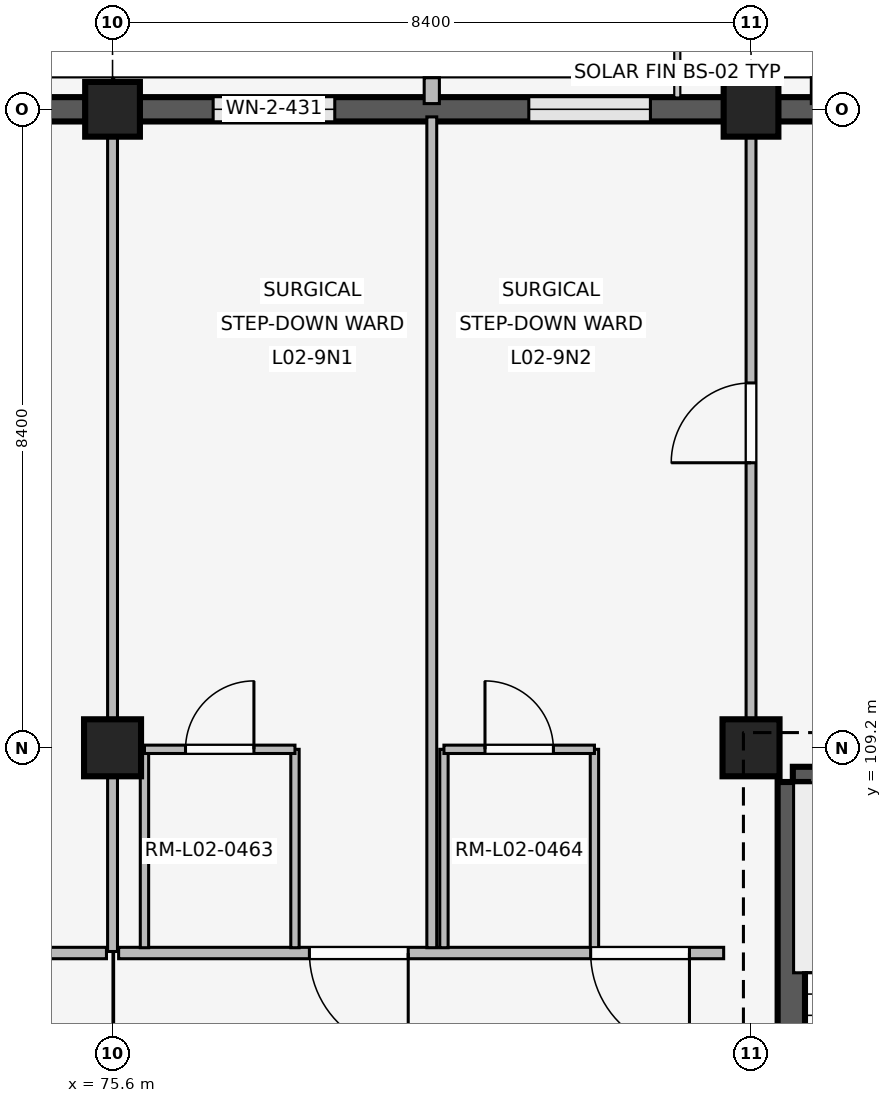
"""IFC4 building model, lengths in metres.
Left out: names, types, materials, properties, quantities, classifications, styles, units other than length and angle.
Written with IfcOpenShell. Run it as: python <this file> out.ifc"""

import sys

from ifc_helpers import new_model, si_unit, direction, frame, frame_2d, origin, origin_2d, place, context, subcontext, project, spatial, rectangle, extrude, element, fill, save


model = new_model("IFC4")
c1 = context("Model", 3, precision=1e-05, world=origin(), true_north=direction((0.0, 1.0)))
c2 = subcontext(c1, "Body", "Model", "MODEL_VIEW")
j1 = project(units=[si_unit("LENGTHUNIT", "METRE"), si_unit("PLANEANGLEUNIT", "RADIAN")], contexts=[c1])
p1 = place(None, origin())
s1 = spatial("IfcSite", under=j1, at=p1, CompositionType="ELEMENT")
p2 = place(p1, origin())
s2 = spatial("IfcBuilding", under=s1, at=p2, CompositionType="ELEMENT")
p3 = place(p2, frame((0.0, 0.0, 8.1)))
s3 = spatial("IfcBuildingStorey", under=s2, at=p3, CompositionType="ELEMENT", Elevation=8.1)
p4 = place(p3, frame((75.6, 109.2, 0.0), z_axis=(0.0, 0.0, 1.0), x_axis=(1.0, 0.0, 0.0)))
e1 = element("IfcColumn", 1, at=p4, inside=s3, PredefinedType="COLUMN", context=c2, shape_type="SweptSolid", body=[
    extrude(rectangle(XDim=0.75, YDim=0.75, at=origin_2d()), origin(), (0.0, 0.0, 1.0), 4.8),
])
p5 = place(p3, frame((75.6, 117.6, 0.0), z_axis=(0.0, 0.0, 1.0), x_axis=(1.0, 0.0, 0.0)))
e2 = element("IfcColumn", 2, at=p5, inside=s3, PredefinedType="COLUMN", context=c2, shape_type="SweptSolid", body=[
    extrude(rectangle(XDim=0.72, YDim=0.72, at=origin_2d()), origin(), (0.0, 0.0, 1.0), 4.8),
])
p6 = place(p3, frame((84.0, 109.2, 0.0), z_axis=(0.0, 0.0, 1.0), x_axis=(1.0, 0.0, 0.0)))
e3 = element("IfcColumn", 3, at=p6, inside=s3, PredefinedType="COLUMN", context=c2, shape_type="SweptSolid", body=[
    extrude(rectangle(XDim=0.75, YDim=0.75, at=origin_2d()), origin(), (0.0, 0.0, 1.0), 4.8),
])
p7 = place(p3, frame((84.0, 117.6, 0.0), z_axis=(0.0, 0.0, 1.0), x_axis=(1.0, 0.0, 0.0)))
e4 = element("IfcColumn", 4, at=p7, inside=s3, PredefinedType="COLUMN", context=c2, shape_type="SweptSolid", body=[
    extrude(rectangle(XDim=0.72, YDim=0.72, at=origin_2d()), origin(), (0.0, 0.0, 1.0), 4.8),
])
p8 = place(p3, frame((67.555, 117.6, 0.0), z_axis=(0.0, 0.0, 1.0), x_axis=(1.0, 0.0, 0.0)))
e5 = element("IfcWall", 5, at=p8, inside=s3, PredefinedType="SOLIDWALL", context=c2, shape_type="SweptSolid", body=[
    extrude(rectangle(XDim=7.69, YDim=0.32, at=frame_2d((3.845, 0.0))), origin(), (0.0, 0.0, 1.0), 3.86),
])
p9 = place(p8, frame((0.959, 0.0, 0.85)))
e6 = element("IfcOpeningElement", 6, at=p9, cuts=e5, PredefinedType="OPENING", context=c2, shape_type="SweptSolid", body=[
    extrude(rectangle(XDim=1.62, YDim=1.52, at=frame_2d((0.81, 0.76))), frame((0.0, 0.17, 0.0), z_axis=(0.0, -1.0, 0.0), x_axis=(1.0, 0.0, 0.0)), (0.0, 0.0, 1.0), 0.34),
])
p10 = place(p8, frame((5.111, 0.0, 0.85)))
e7 = element("IfcOpeningElement", 7, at=p10, cuts=e5, PredefinedType="OPENING", context=c2, shape_type="SweptSolid", body=[
    extrude(rectangle(XDim=1.62, YDim=1.52, at=frame_2d((0.81, 0.76))), frame((0.0, 0.17, 0.0), z_axis=(0.0, -1.0, 0.0), x_axis=(1.0, 0.0, 0.0)), (0.0, 0.0, 1.0), 0.34),
])
p11 = place(p3, frame((75.955, 117.6, 0.0), z_axis=(0.0, 0.0, 1.0), x_axis=(1.0, 0.0, 0.0)))
e8 = element("IfcWall", 8, at=p11, inside=s3, PredefinedType="SOLIDWALL", context=c2, shape_type="SweptSolid", body=[
    extrude(rectangle(XDim=7.69, YDim=0.32, at=frame_2d((3.845, 0.0))), origin(), (0.0, 0.0, 1.0), 3.86),
])
p12 = place(p11, frame((0.969, 0.0, 0.85)))
e9 = element("IfcOpeningElement", 9, at=p12, cuts=e8, PredefinedType="OPENING", context=c2, shape_type="SweptSolid", body=[
    extrude(rectangle(XDim=1.6, YDim=1.65, at=frame_2d((0.8, 0.825))), frame((0.0, 0.17, 0.0), z_axis=(0.0, -1.0, 0.0), x_axis=(1.0, 0.0, 0.0)), (0.0, 0.0, 1.0), 0.34),
])
p13 = place(p11, frame((5.121, 0.0, 0.85)))
e10 = element("IfcOpeningElement", 10, at=p13, cuts=e8, PredefinedType="OPENING", context=c2, shape_type="SweptSolid", body=[
    extrude(rectangle(XDim=1.6, YDim=1.65, at=frame_2d((0.8, 0.825))), frame((0.0, 0.17, 0.0), z_axis=(0.0, -1.0, 0.0), x_axis=(1.0, 0.0, 0.0)), (0.0, 0.0, 1.0), 0.34),
])
p14 = place(p3, frame((79.8, 117.675, 0.0), z_axis=(0.0, 0.0, 1.0), x_axis=(0.0, 1.0, 0.0)))
e11 = element("IfcWall", 11, at=p14, inside=s3, PredefinedType="ELEMENTEDWALL", context=c2, shape_type="SweptSolid", body=[
    extrude(rectangle(XDim=0.34, YDim=0.2, at=frame_2d((0.17, 0.0))), origin(), (0.0, 0.0, 1.0), 3.84),
])
p15 = place(p3, frame((84.355, 117.6, 0.0), z_axis=(0.0, 0.0, 1.0), x_axis=(1.0, 0.0, 0.0)))
e12 = element("IfcWall", 12, at=p15, inside=s3, PredefinedType="SOLIDWALL", context=c2, shape_type="SweptSolid", body=[
    extrude(rectangle(XDim=7.69, YDim=0.32, at=frame_2d((3.845, 0.0))), origin(), (0.0, 0.0, 1.0), 3.86),
])
p16 = place(p15, frame((1.009, 0.0, 0.85)))
e13 = element("IfcOpeningElement", 13, at=p16, cuts=e12, PredefinedType="OPENING", context=c2, shape_type="SweptSolid", body=[
    extrude(rectangle(XDim=1.52, YDim=1.65, at=frame_2d((0.76, 0.825))), frame((0.0, 0.17, 0.0), z_axis=(0.0, -1.0, 0.0), x_axis=(1.0, 0.0, 0.0)), (0.0, 0.0, 1.0), 0.34),
])
p17 = place(p15, frame((5.161, 0.0, 0.85)))
e14 = element("IfcOpeningElement", 14, at=p17, cuts=e12, PredefinedType="OPENING", context=c2, shape_type="SweptSolid", body=[
    extrude(rectangle(XDim=1.52, YDim=1.65, at=frame_2d((0.76, 0.825))), frame((0.0, 0.17, 0.0), z_axis=(0.0, -1.0, 0.0), x_axis=(1.0, 0.0, 0.0)), (0.0, 0.0, 1.0), 0.34),
])
p18 = place(p3, frame((84.893, 117.675, 0.0), z_axis=(0.0, 0.0, 1.0), x_axis=(0.0, 1.0, 0.0)))
e15 = element("IfcWall", 15, at=p18, inside=s3, PredefinedType="ELEMENTEDWALL", context=c2, shape_type="SweptSolid", body=[
    extrude(rectangle(XDim=0.34, YDim=0.2, at=frame_2d((0.17, 0.0))), origin(), (0.0, 0.0, 1.0), 3.84),
])
p19 = place(p3, frame((84.55, 108.75, 0.0), z_axis=(0.0, 0.0, 1.0), x_axis=(1.0, 0.0, 0.0)))
e16 = element("IfcWall", 16, at=p19, inside=s3, PredefinedType="SHEAR", context=c2, shape_type="SweptSolid", body=[
    extrude(rectangle(XDim=7.5, YDim=0.4, at=frame_2d((3.75, 0.0))), origin(), (0.0, 0.0, 1.0), 4.52),
])
p20 = place(p3, frame((84.55, 101.2, 0.0), z_axis=(0.0, 0.0, 1.0), x_axis=(0.0, 1.0, 0.0)))
e17 = element("IfcWall", 17, at=p20, inside=s3, PredefinedType="SHEAR", context=c2, shape_type="SweptSolid", body=[
    extrude(rectangle(XDim=7.55, YDim=0.4, at=frame_2d((3.775, 0.0))), origin(), (0.0, 0.0, 1.0), 4.52),
])
p21 = place(p20, frame((0.28, 0.0, 0.0)))
e18 = element("IfcOpeningElement", 18, at=p21, cuts=e17, PredefinedType="OPENING", context=c2, shape_type="SweptSolid", body=[
    extrude(rectangle(XDim=1.0, YDim=2.15, at=frame_2d((0.5, 1.075))), frame((0.0, 0.21, 0.0), z_axis=(0.0, -1.0, 0.0), x_axis=(1.0, 0.0, 0.0)), (0.0, 0.0, 1.0), 0.42),
])
p22 = place(p3, frame((75.52, 106.5, 0.0), z_axis=(0.0, 0.0, 1.0), x_axis=(-1.0, 0.0, 0.0)))
e19 = element("IfcWall", 19, at=p22, inside=s3, PredefinedType="PARTITIONING", context=c2, shape_type="SweptSolid", body=[
    extrude(rectangle(XDim=8.24, YDim=0.15, at=frame_2d((4.12, 0.0))), origin(), (0.0, 0.0, 1.0), 3.84),
])
p23 = place(p22, frame((3.37, 0.0, 0.0)))
e20 = element("IfcOpeningElement", 20, at=p23, cuts=e19, PredefinedType="OPENING", context=c2, shape_type="SweptSolid", body=[
    extrude(rectangle(XDim=1.5, YDim=2.3, at=frame_2d((0.75, 1.15))), frame((0.0, 0.085, 0.0), z_axis=(0.0, -1.0, 0.0), x_axis=(1.0, 0.0, 0.0)), (0.0, 0.0, 1.0), 0.17),
])
p24 = place(p3, frame((75.6, 106.52, 0.0), z_axis=(0.0, 0.0, 1.0), x_axis=(0.0, 1.0, 0.0)))
e21 = element("IfcWall", 21, at=p24, inside=s3, PredefinedType="PARTITIONING", context=c2, shape_type="SweptSolid", body=[
    extrude(rectangle(XDim=10.94, YDim=0.13, at=frame_2d((5.47, 0.0))), origin(), (0.0, 0.0, 1.0), 3.84),
])
p25 = place(p3, frame((83.64, 106.5, 0.0), z_axis=(0.0, 0.0, 1.0), x_axis=(-1.0, 0.0, 0.0)))
e22 = element("IfcWall", 22, at=p25, inside=s3, PredefinedType="PARTITIONING", context=c2, shape_type="SweptSolid", body=[
    extrude(rectangle(XDim=7.96, YDim=0.15, at=frame_2d((3.98, 0.0))), origin(), (0.0, 0.0, 1.0), 3.84),
])
p26 = place(p25, frame((0.45, 0.0, 0.0)))
e23 = element("IfcOpeningElement", 23, at=p26, cuts=e22, PredefinedType="OPENING", context=c2, shape_type="SweptSolid", body=[
    extrude(rectangle(XDim=1.3, YDim=2.25, at=frame_2d((0.65, 1.125))), frame((0.0, 0.085, 0.0), z_axis=(0.0, -1.0, 0.0), x_axis=(1.0, 0.0, 0.0)), (0.0, 0.0, 1.0), 0.17),
])
p27 = place(p25, frame((4.15, 0.0, 0.0)))
e24 = element("IfcOpeningElement", 24, at=p27, cuts=e22, PredefinedType="OPENING", context=c2, shape_type="SweptSolid", body=[
    extrude(rectangle(XDim=1.3, YDim=2.25, at=frame_2d((0.65, 1.125))), frame((0.0, 0.085, 0.0), z_axis=(0.0, -1.0, 0.0), x_axis=(1.0, 0.0, 0.0)), (0.0, 0.0, 1.0), 0.17),
])
p28 = place(p3, frame((79.8, 106.57, 0.0), z_axis=(0.0, 0.0, 1.0), x_axis=(0.0, 1.0, 0.0)))
e25 = element("IfcWall", 25, at=p28, inside=s3, PredefinedType="PARTITIONING", context=c2, shape_type="SweptSolid", body=[
    extrude(rectangle(XDim=10.93, YDim=0.13, at=frame_2d((5.465, 0.0))), origin(), (0.0, 0.0, 1.0), 3.84),
])
for number, where, z_axis, x_axis in (
    (26, (76.02, 106.57, 0.0), (0.0, 0.0, 1.0), (0.0, 1.0, 0.0)),
    (27, (78.0, 106.57, 0.0), (0.0, 0.0, 1.0), (0.0, 1.0, 0.0)),
):
    element("IfcWall", number, at=place(p3, frame(where, z_axis=z_axis, x_axis=x_axis)), inside=s3, PredefinedType="PARTITIONING", context=c2, shape_type="SweptSolid", body=[
        extrude(rectangle(XDim=2.61, YDim=0.11, at=frame_2d((1.305, 0.0))), origin(), (0.0, 0.0, 1.0), 3.84),
    ])
p29 = place(p3, frame((76.02, 109.18, 0.0), z_axis=(0.0, 0.0, 1.0), x_axis=(1.0, 0.0, 0.0)))
e28 = element("IfcWall", 28, at=p29, inside=s3, PredefinedType="PARTITIONING", context=c2, shape_type="SweptSolid", body=[
    extrude(rectangle(XDim=1.98, YDim=0.11, at=frame_2d((0.99, 0.0))), origin(), (0.0, 0.0, 1.0), 3.84),
])
p30 = place(p29, frame((0.54, 0.0, 0.0)))
e29 = element("IfcOpeningElement", 29, at=p30, cuts=e28, PredefinedType="OPENING", context=c2, shape_type="SweptSolid", body=[
    extrude(rectangle(XDim=0.9, YDim=2.1, at=frame_2d((0.45, 1.05))), frame((0.0, 0.065, 0.0), z_axis=(0.0, -1.0, 0.0), x_axis=(1.0, 0.0, 0.0)), (0.0, 0.0, 1.0), 0.13),
])
for number, where, z_axis, x_axis in (
    (30, (79.96, 106.57, 0.0), (0.0, 0.0, 1.0), (0.0, 1.0, 0.0)),
    (31, (81.94, 106.57, 0.0), (0.0, 0.0, 1.0), (0.0, 1.0, 0.0)),
):
    element("IfcWall", number, at=place(p3, frame(where, z_axis=z_axis, x_axis=x_axis)), inside=s3, PredefinedType="PARTITIONING", context=c2, shape_type="SweptSolid", body=[
        extrude(rectangle(XDim=2.61, YDim=0.11, at=frame_2d((1.305, 0.0))), origin(), (0.0, 0.0, 1.0), 3.84),
    ])
p31 = place(p3, frame((79.96, 109.18, 0.0), z_axis=(0.0, 0.0, 1.0), x_axis=(1.0, 0.0, 0.0)))
e32 = element("IfcWall", 32, at=p31, inside=s3, PredefinedType="PARTITIONING", context=c2, shape_type="SweptSolid", body=[
    extrude(rectangle(XDim=1.98, YDim=0.11, at=frame_2d((0.99, 0.0))), origin(), (0.0, 0.0, 1.0), 3.84),
])
p32 = place(p31, frame((0.54, 0.0, 0.0)))
e33 = element("IfcOpeningElement", 33, at=p32, cuts=e32, PredefinedType="OPENING", context=c2, shape_type="SweptSolid", body=[
    extrude(rectangle(XDim=0.9, YDim=2.1, at=frame_2d((0.45, 1.05))), frame((0.0, 0.065, 0.0), z_axis=(0.0, -1.0, 0.0), x_axis=(1.0, 0.0, 0.0)), (0.0, 0.0, 1.0), 0.13),
])
p33 = place(p3, frame((84.0, 109.55, 0.0), z_axis=(0.0, 0.0, 1.0), x_axis=(0.0, 1.0, 0.0)))
e34 = element("IfcWall", 34, at=p33, inside=s3, PredefinedType="PARTITIONING", context=c2, shape_type="SweptSolid", body=[
    extrude(rectangle(XDim=7.91, YDim=0.13, at=frame_2d((3.955, 0.0))), origin(), (0.0, 0.0, 1.0), 3.84),
])
p34 = place(p33, frame((3.4, 0.0, 0.0)))
e35 = element("IfcOpeningElement", 35, at=p34, cuts=e34, PredefinedType="OPENING", context=c2, shape_type="SweptSolid", body=[
    extrude(rectangle(XDim=1.05, YDim=2.2, at=frame_2d((0.525, 1.1))), frame((0.0, 0.075, 0.0), z_axis=(0.0, -1.0, 0.0), x_axis=(1.0, 0.0, 0.0)), (0.0, 0.0, 1.0), 0.15),
])
p35 = place(p12, origin())
e36 = element("IfcWindow", 36, at=p35, inside=s3, PartitioningType="SINGLE_PANEL", PredefinedType="WINDOW", context=c2, shape_type="SweptSolid", body=[
    extrude(rectangle(XDim=1.6, YDim=1.65, at=frame_2d((0.8, 0.825))), frame((0.0, 0.03, 0.0), z_axis=(0.0, -1.0, 0.0), x_axis=(1.0, 0.0, 0.0)), (0.0, 0.0, 1.0), 0.06),
])
fill(e9, e36)
p36 = place(p13, origin())
e37 = element("IfcWindow", 37, at=p36, inside=s3, PartitioningType="SINGLE_PANEL", PredefinedType="WINDOW", context=c2, shape_type="SweptSolid", body=[
    extrude(rectangle(XDim=1.6, YDim=1.65, at=frame_2d((0.8, 0.825))), frame((0.0, 0.03, 0.0), z_axis=(0.0, -1.0, 0.0), x_axis=(1.0, 0.0, 0.0)), (0.0, 0.0, 1.0), 0.06),
])
fill(e10, e37)
p37 = place(p26, origin())
e38 = element("IfcDoor", 38, at=p37, inside=s3, OperationType="SINGLE_SWING_LEFT", PredefinedType="DOOR", context=c2, shape_type="SweptSolid", body=[
    extrude(rectangle(XDim=1.3, YDim=2.25, at=frame_2d((0.65, 1.125))), frame((0.0, 0.025, 0.0), z_axis=(0.0, -1.0, 0.0), x_axis=(1.0, 0.0, 0.0)), (0.0, 0.0, 1.0), 0.05),
])
fill(e23, e38)
p38 = place(p27, origin())
e39 = element("IfcDoor", 39, at=p38, inside=s3, OperationType="SINGLE_SWING_LEFT", PredefinedType="DOOR", context=c2, shape_type="SweptSolid", body=[
    extrude(rectangle(XDim=1.3, YDim=2.25, at=frame_2d((0.65, 1.125))), frame((0.0, 0.025, 0.0), z_axis=(0.0, -1.0, 0.0), x_axis=(1.0, 0.0, 0.0)), (0.0, 0.0, 1.0), 0.05),
])
fill(e24, e39)
p39 = place(p30, origin())
e40 = element("IfcDoor", 40, at=p39, inside=s3, OperationType="SINGLE_SWING_RIGHT", PredefinedType="DOOR", context=c2, shape_type="SweptSolid", body=[
    extrude(rectangle(XDim=0.9, YDim=2.1, at=frame_2d((0.45, 1.05))), frame((0.0, 0.025, 0.0), z_axis=(0.0, -1.0, 0.0), x_axis=(1.0, 0.0, 0.0)), (0.0, 0.0, 1.0), 0.05),
])
fill(e29, e40)
p40 = place(p32, origin())
e41 = element("IfcDoor", 41, at=p40, inside=s3, OperationType="SINGLE_SWING_LEFT", PredefinedType="DOOR", context=c2, shape_type="SweptSolid", body=[
    extrude(rectangle(XDim=0.9, YDim=2.1, at=frame_2d((0.45, 1.05))), frame((0.0, 0.025, 0.0), z_axis=(0.0, -1.0, 0.0), x_axis=(1.0, 0.0, 0.0)), (0.0, 0.0, 1.0), 0.05),
])
fill(e33, e41)
p41 = place(p34, origin())
e42 = element("IfcDoor", 42, at=p41, inside=s3, OperationType="SINGLE_SWING_LEFT", PredefinedType="DOOR", context=c2, shape_type="SweptSolid", body=[
    extrude(rectangle(XDim=1.05, YDim=2.2, at=frame_2d((0.525, 1.1))), frame((0.0, 0.025, 0.0), z_axis=(0.0, -1.0, 0.0), x_axis=(1.0, 0.0, 0.0)), (0.0, 0.0, 1.0), 0.05),
])
fill(e35, e42)
save(model, sys.argv[1])
